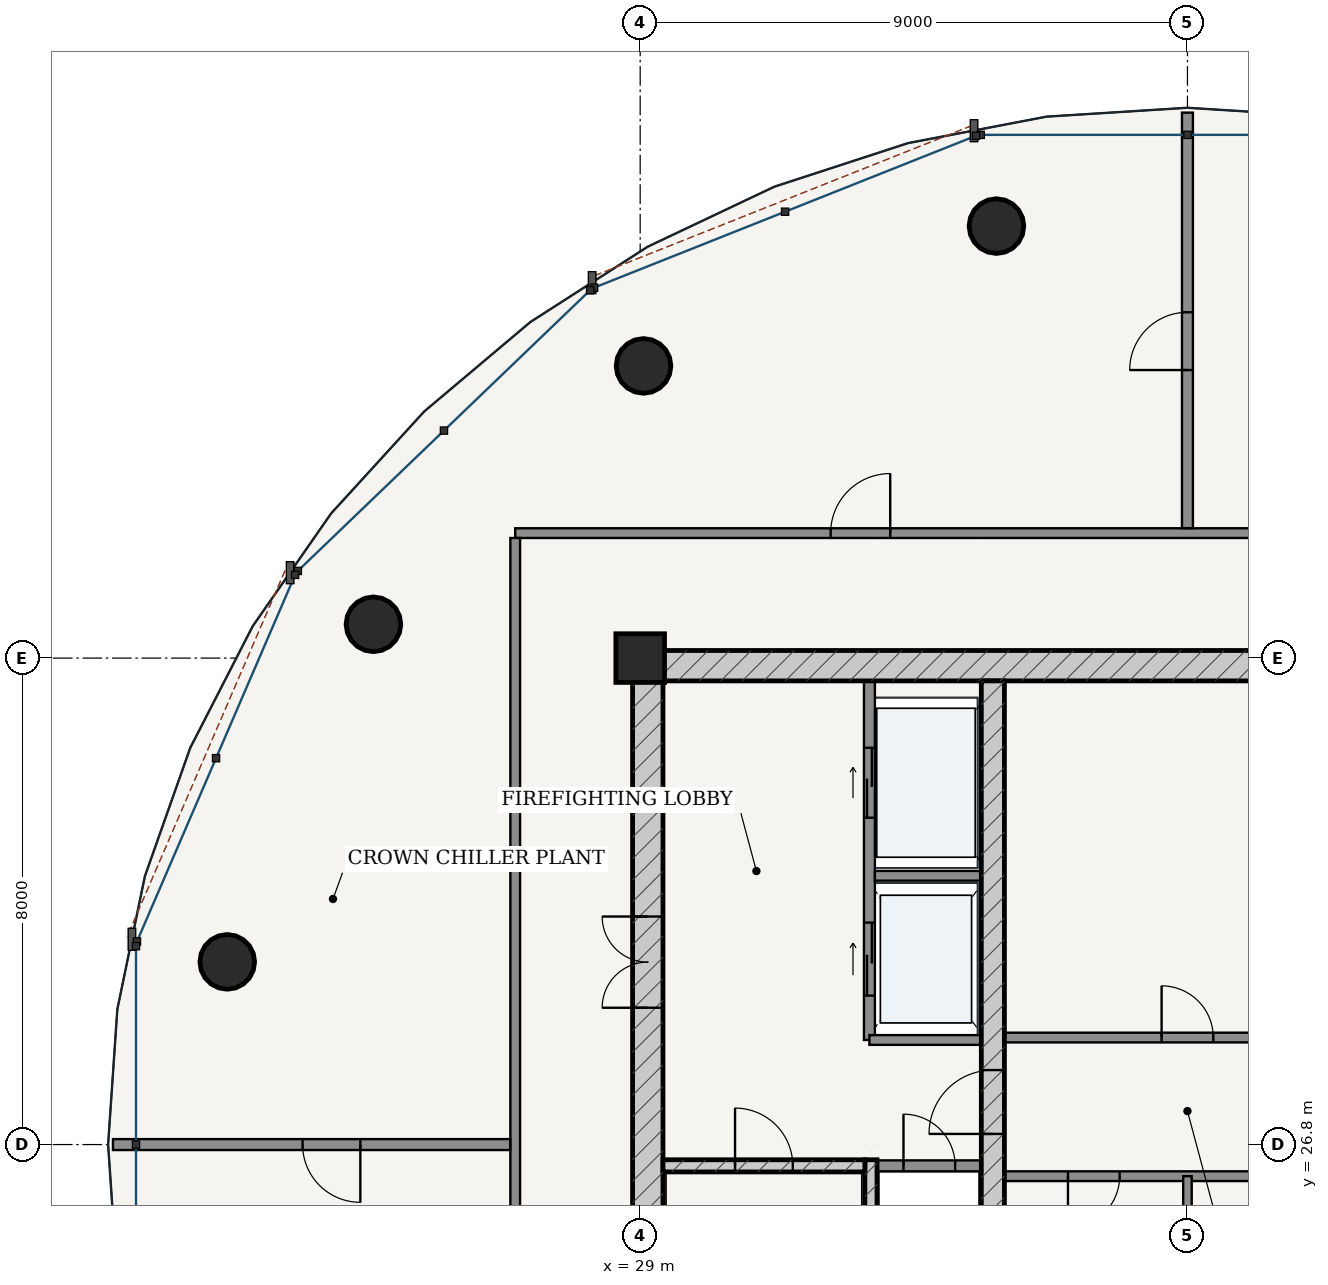
"""IFC4 building model, lengths in metres.
Left out: names, types, materials, properties, quantities, classifications, styles, units other than length and angle.
Written with IfcOpenShell. Run it as: python <this file> out.ifc"""

import sys

from ifc_helpers import new_model, si_unit, direction, frame, frame_2d, origin, origin_2d, place, context, subcontext, project, spatial, rectangle, hollow_circle, extrude, source, transform, mapped, element, fill, save


model = new_model("IFC4")
c1 = context("Model", 3, precision=1e-05, world=origin(), true_north=direction((-0.2419218956, 0.970295726276)))
c2 = subcontext(c1, "Body", "Model", "MODEL_VIEW")
j1 = project(units=[si_unit("LENGTHUNIT", "METRE"), si_unit("PLANEANGLEUNIT", "RADIAN")], contexts=[c1])
p1 = place(None, origin())
s1 = spatial("IfcSite", under=j1, at=p1, CompositionType="ELEMENT")
p2 = place(p1, origin())
s2 = spatial("IfcBuilding", under=s1, at=p2, CompositionType="ELEMENT")
p3 = place(p2, frame((0.0, 0.0, 316.5)))
s3 = spatial("IfcBuildingStorey", under=s2, at=p3, CompositionType="ELEMENT", Elevation=316.5)
p4 = place(p3, frame((29.0, 34.8, 0.0), z_axis=(0.0, 0.0, 1.0), x_axis=(1.0, 0.0, 0.0)))
e1 = element("IfcColumn", 1, at=p4, inside=s3, PredefinedType="COLUMN", context=c2, shape_type="SweptSolid", body=[
    extrude(rectangle(XDim=0.8, YDim=0.8, at=origin_2d()), origin(), (0.0, 0.0, 1.0), 5.2),
])
p5 = place(p3, frame((28.875, 34.675, 0.0), z_axis=(0.0, 0.0, 1.0), x_axis=(1.0, 0.0, 0.0)))
e2 = element("IfcWall", 2, at=p5, inside=s3, PredefinedType="SHEAR", context=c2, shape_type="SweptSolid", body=[
    extrude(rectangle(XDim=18.25, YDim=0.5, at=frame_2d((9.125, 0.0))), origin(), (0.0, 0.0, 1.0), 4.78),
])
p6 = place(p3, frame((29.125, 19.175, 0.0), z_axis=(0.0, 0.0, 1.0), x_axis=(0.0, 1.0, 0.0)))
e3 = element("IfcWall", 3, at=p6, inside=s3, PredefinedType="SHEAR", context=c2, shape_type="SweptSolid", body=[
    extrude(rectangle(XDim=15.25, YDim=0.5, at=frame_2d((7.625, 0.0))), origin(), (0.0, 0.0, 1.0), 4.78),
])
p7 = place(p6, frame((9.875, 0.0, 0.0)))
e4 = element("IfcOpeningElement", 4, at=p7, cuts=e3, PredefinedType="OPENING", context=c2, shape_type="SweptSolid", body=[
    extrude(rectangle(XDim=1.5, YDim=2.2, at=frame_2d((0.75, 1.1))), frame((0.0, 0.26, 0.0), z_axis=(0.0, -1.0, 0.0), x_axis=(1.0, 0.0, 0.0)), (0.0, 0.0, 1.0), 0.52),
])
p8 = place(p3, frame((32.795, 19.175, 0.0), z_axis=(0.0, 0.0, 1.0), x_axis=(0.0, 1.0, 0.0)))
e5 = element("IfcWall", 5, at=p8, inside=s3, PredefinedType="SOLIDWALL", context=c2, shape_type="SweptSolid", body=[
    extrude(rectangle(XDim=7.375, YDim=0.2, at=frame_2d((3.688, 0.0))), origin(), (0.0, 0.0, 1.0), 4.78),
])
p9 = place(p3, frame((29.375, 26.45, 0.0), z_axis=(0.0, 0.0, 1.0), x_axis=(1.0, 0.0, 0.0)))
e6 = element("IfcWall", 6, at=p9, inside=s3, PredefinedType="SOLIDWALL", context=c2, shape_type="SweptSolid", body=[
    extrude(rectangle(XDim=3.32, YDim=0.2, at=frame_2d((1.66, 0.0))), origin(), (0.0, 0.0, 1.0), 4.78),
])
p10 = place(p9, frame((1.185, 0.0, 0.0)))
e7 = element("IfcOpeningElement", 7, at=p10, cuts=e6, PredefinedType="OPENING", context=c2, shape_type="SweptSolid", body=[
    extrude(rectangle(XDim=0.95, YDim=2.15, at=frame_2d((0.475, 1.075))), frame((0.0, 0.11, 0.0), z_axis=(0.0, -1.0, 0.0), x_axis=(1.0, 0.0, 0.0)), (0.0, 0.0, 1.0), 0.22),
])
p11 = place(p3, frame((34.8, 19.175, 0.0), z_axis=(0.0, 0.0, 1.0), x_axis=(0.0, 1.0, 0.0)))
e8 = element("IfcWall", 8, at=p11, inside=s3, PredefinedType="SHEAR", context=c2, shape_type="SweptSolid", body=[
    extrude(rectangle(XDim=15.25, YDim=0.38, at=frame_2d((7.625, 0.0))), origin(), (0.0, 0.0, 1.0), 4.78),
])
p12 = place(p11, frame((7.8, 0.0, 0.0)))
e9 = element("IfcOpeningElement", 9, at=p12, cuts=e8, PredefinedType="OPENING", context=c2, shape_type="SweptSolid", body=[
    extrude(rectangle(XDim=1.05, YDim=2.15, at=frame_2d((0.525, 1.075))), frame((0.0, 0.2, 0.0), z_axis=(0.0, -1.0, 0.0), x_axis=(1.0, 0.0, 0.0)), (0.0, 0.0, 1.0), 0.4),
])
for number, where, z_axis, x_axis in (
    (10, (34.859, 41.904, 0.0), (0.0, 0.0, 1.0), (1.0, 0.0, 0.0)),
    (11, (29.055, 39.605, 0.0), (0.0, 0.0, 1.0), (1.0, 0.0, 0.0)),
    (12, (24.613, 35.356, 0.0), (0.0, 0.0, 1.0), (1.0, 0.0, 0.0)),
    (13, (22.209, 29.804, 0.0), (0.0, 0.0, 1.0), (1.0, 0.0, 0.0)),
):
    element("IfcColumn", number, at=place(p3, frame(where, z_axis=z_axis, x_axis=x_axis)), inside=s3, PredefinedType="COLUMN", context=c2, shape_type="SweptSolid", body=[
        extrude(hollow_circle(Radius=0.45, WallThickness=0.032, at=origin_2d()), origin(), (0.0, 0.0, 1.0), 5.2),
    ])
p13 = place(p3, frame((32.9, 26.45, 0.0), z_axis=(0.0, 0.0, 1.0), x_axis=(1.0, 0.0, 0.0)))
e14 = element("IfcWall", 14, at=p13, inside=s3, PredefinedType="PARTITIONING", context=c2, shape_type="SweptSolid", body=[
    extrude(rectangle(XDim=1.71, YDim=0.18, at=frame_2d((0.855, 0.0))), origin(), (0.0, 0.0, 1.0), 4.78),
])
p14 = place(p13, frame((0.43, 0.0, 0.0)))
e15 = element("IfcOpeningElement", 15, at=p14, cuts=e14, PredefinedType="OPENING", context=c2, shape_type="SweptSolid", body=[
    extrude(rectangle(XDim=0.85, YDim=2.1, at=frame_2d((0.425, 1.05))), frame((0.0, 0.1, 0.0), z_axis=(0.0, -1.0, 0.0), x_axis=(1.0, 0.0, 0.0)), (0.0, 0.0, 1.0), 0.2),
])
p15 = place(p3, frame((32.77, 28.52, 0.0), z_axis=(0.0, 0.0, 1.0), x_axis=(0.0, 1.0, 0.0)))
e16 = element("IfcWall", 16, at=p15, inside=s3, PredefinedType="PARTITIONING", context=c2, shape_type="SweptSolid", body=[
    extrude(rectangle(XDim=5.905, YDim=0.18, at=frame_2d((2.953, 0.0))), origin(), (0.0, 0.0, 1.0), 4.78),
])
p16 = place(p15, frame((3.655, 0.0, 0.0)))
e17 = element("IfcOpeningElement", 17, at=p16, cuts=e16, PredefinedType="OPENING", context=c2, shape_type="SweptSolid", body=[
    extrude(rectangle(XDim=1.15, YDim=2.2, at=frame_2d((0.575, 1.1))), frame((0.0, 0.1, 0.0), z_axis=(0.0, -1.0, 0.0), x_axis=(1.0, 0.0, 0.0)), (0.0, 0.0, 1.0), 0.2),
])
p17 = place(p15, frame((0.73, 0.0, 0.0)))
e18 = element("IfcOpeningElement", 18, at=p17, cuts=e16, PredefinedType="OPENING", context=c2, shape_type="SweptSolid", body=[
    extrude(rectangle(XDim=1.2, YDim=2.25, at=frame_2d((0.6, 1.125))), frame((0.0, 0.1, 0.0), z_axis=(0.0, -1.0, 0.0), x_axis=(1.0, 0.0, 0.0)), (0.0, 0.0, 1.0), 0.2),
])
p18 = place(p3, frame((32.86, 31.22, 0.0), z_axis=(0.0, 0.0, 1.0), x_axis=(1.0, 0.0, 0.0)))
e19 = element("IfcWall", 19, at=p18, inside=s3, PredefinedType="PARTITIONING", context=c2, shape_type="SweptSolid", body=[
    extrude(rectangle(XDim=1.75, YDim=0.16, at=frame_2d((0.875, 0.0))), origin(), (0.0, 0.0, 1.0), 4.78),
])
p19 = place(p3, frame((32.77, 28.52, 0.0), z_axis=(0.0, 0.0, 1.0), x_axis=(1.0, 0.0, 0.0)))
e20 = element("IfcWall", 20, at=p19, inside=s3, PredefinedType="PARTITIONING", context=c2, shape_type="SweptSolid", body=[
    extrude(rectangle(XDim=1.84, YDim=0.16, at=frame_2d((0.92, 0.0))), origin(), (0.0, 0.0, 1.0), 4.78),
])
p20 = place(p3, frame((34.99, 28.56, 0.0), z_axis=(0.0, 0.0, 1.0), x_axis=(1.0, 0.0, 0.0)))
e21 = element("IfcWall", 21, at=p20, inside=s3, PredefinedType="PARTITIONING", context=c2, shape_type="SweptSolid", body=[
    extrude(rectangle(XDim=6.02, YDim=0.16, at=frame_2d((3.01, 0.0))), origin(), (0.0, 0.0, 1.0), 4.78),
])
p21 = place(p20, frame((2.585, 0.0, 0.0)))
e22 = element("IfcOpeningElement", 22, at=p21, cuts=e21, PredefinedType="OPENING", context=c2, shape_type="SweptSolid", body=[
    extrude(rectangle(XDim=0.85, YDim=2.1, at=frame_2d((0.425, 1.05))), frame((0.0, 0.09, 0.0), z_axis=(0.0, -1.0, 0.0), x_axis=(1.0, 0.0, 0.0)), (0.0, 0.0, 1.0), 0.18),
])
p22 = place(p3, frame((34.99, 26.28, 0.0), z_axis=(0.0, 0.0, 1.0), x_axis=(1.0, 0.0, 0.0)))
e23 = element("IfcWall", 23, at=p22, inside=s3, PredefinedType="PARTITIONING", context=c2, shape_type="SweptSolid", body=[
    extrude(rectangle(XDim=6.02, YDim=0.16, at=frame_2d((3.01, 0.0))), origin(), (0.0, 0.0, 1.0), 4.78),
])
p23 = place(p22, frame((1.045, 0.0, 0.0)))
e24 = element("IfcOpeningElement", 24, at=p23, cuts=e23, PredefinedType="OPENING", context=c2, shape_type="SweptSolid", body=[
    extrude(rectangle(XDim=0.85, YDim=2.1, at=frame_2d((0.425, 1.05))), frame((0.0, 0.09, 0.0), z_axis=(0.0, -1.0, 0.0), x_axis=(1.0, 0.0, 0.0)), (0.0, 0.0, 1.0), 0.18),
])
p24 = place(p22, frame((4.125, 0.0, 0.0)))
e25 = element("IfcOpeningElement", 25, at=p24, cuts=e23, PredefinedType="OPENING", context=c2, shape_type="SweptSolid", body=[
    extrude(rectangle(XDim=0.85, YDim=2.1, at=frame_2d((0.425, 1.05))), frame((0.0, 0.09, 0.0), z_axis=(0.0, -1.0, 0.0), x_axis=(1.0, 0.0, 0.0)), (0.0, 0.0, 1.0), 0.18),
])
p25 = place(p3, frame((38.0, 23.72, 0.0), z_axis=(0.0, 0.0, 1.0), x_axis=(0.0, 1.0, 0.0)))
e26 = element("IfcWall", 26, at=p25, inside=s3, PredefinedType="PARTITIONING", context=c2, shape_type="SweptSolid", body=[
    extrude(rectangle(XDim=2.56, YDim=0.14, at=frame_2d((1.28, 0.0))), origin(), (0.0, 0.0, 1.0), 4.78),
])
p26 = place(p3, frame((26.945, 36.855, 0.0), z_axis=(0.0, 0.0, 1.0), x_axis=(1.0, 0.0, 0.0)))
e27 = element("IfcWall", 27, at=p26, inside=s3, PredefinedType="PARTITIONING", context=c2, shape_type="SweptSolid", body=[
    extrude(rectangle(XDim=22.11, YDim=0.16, at=frame_2d((11.055, 0.0))), origin(), (0.0, 0.0, 1.0), 4.352),
])
p27 = place(p26, frame((15.943, 0.0, 0.0)))
e28 = element("IfcOpeningElement", 28, at=p27, cuts=e27, PredefinedType="OPENING", context=c2, shape_type="SweptSolid", body=[
    extrude(rectangle(XDim=0.98, YDim=2.2, at=frame_2d((0.49, 1.1))), frame((0.0, 0.09, 0.0), z_axis=(0.0, -1.0, 0.0), x_axis=(1.0, 0.0, 0.0)), (0.0, 0.0, 1.0), 0.18),
])
p28 = place(p26, frame((5.187, 0.0, 0.0)))
e29 = element("IfcOpeningElement", 29, at=p28, cuts=e27, PredefinedType="OPENING", context=c2, shape_type="SweptSolid", body=[
    extrude(rectangle(XDim=0.98, YDim=2.2, at=frame_2d((0.49, 1.1))), frame((0.0, 0.09, 0.0), z_axis=(0.0, -1.0, 0.0), x_axis=(1.0, 0.0, 0.0)), (0.0, 0.0, 1.0), 0.18),
])
p29 = place(p3, frame((26.945, 16.825, 0.0), z_axis=(0.0, 0.0, 1.0), x_axis=(0.0, 1.0, 0.0)))
e30 = element("IfcWall", 30, at=p29, inside=s3, PredefinedType="PARTITIONING", context=c2, shape_type="SweptSolid", body=[
    extrude(rectangle(XDim=19.95, YDim=0.16, at=frame_2d((9.975, 0.0))), origin(), (0.0, 0.0, 1.0), 4.352),
])
p30 = place(p3, frame((38.0, 36.937, 0.0), z_axis=(0.0, 0.0, 1.0), x_axis=(0.0, 1.0, 0.0)))
e31 = element("IfcWall", 31, at=p30, inside=s3, PredefinedType="PARTITIONING", context=c2, shape_type="SweptSolid", body=[
    extrude(rectangle(XDim=6.833, YDim=0.18, at=frame_2d((3.417, 0.0))), origin(), (0.0, 0.0, 1.0), 4.411),
])
p31 = place(p30, frame((2.6, 0.0, 0.0)))
e32 = element("IfcOpeningElement", 32, at=p31, cuts=e31, PredefinedType="OPENING", context=c2, shape_type="SweptSolid", body=[
    extrude(rectangle(XDim=0.95, YDim=2.15, at=frame_2d((0.475, 1.075))), frame((0.0, 0.1, 0.0), z_axis=(0.0, -1.0, 0.0), x_axis=(1.0, 0.0, 0.0)), (0.0, 0.0, 1.0), 0.2),
])
p32 = place(p3, frame((26.863, 26.8, 0.0), z_axis=(0.0, 0.0, 1.0), x_axis=(-1.0, 0.0, 0.0)))
e33 = element("IfcWall", 33, at=p32, inside=s3, PredefinedType="PARTITIONING", context=c2, shape_type="SweptSolid", body=[
    extrude(rectangle(XDim=6.533, YDim=0.18, at=frame_2d((3.267, 0.0))), origin(), (0.0, 0.0, 1.0), 4.411),
])
p33 = place(p32, frame((2.465, 0.0, 0.0)))
e34 = element("IfcOpeningElement", 34, at=p33, cuts=e33, PredefinedType="OPENING", context=c2, shape_type="SweptSolid", body=[
    extrude(rectangle(XDim=0.95, YDim=2.15, at=frame_2d((0.475, 1.075))), frame((0.0, 0.1, 0.0), z_axis=(0.0, -1.0, 0.0), x_axis=(1.0, 0.0, 0.0)), (0.0, 0.0, 1.0), 0.2),
])
m1 = source(origin(), c2, "Body", "SweptSolid", [
    extrude(rectangle(XDim=1.5, YDim=2.2, at=frame_2d((0.75, 1.1))), frame((0.0, 0.025, 0.0), z_axis=(0.0, -1.0, 0.0), x_axis=(1.0, 0.0, 0.0)), (0.0, 0.0, 1.0), 0.05),
])
p34 = place(p7, origin())
e35 = element("IfcDoor", 35, at=p34, inside=s3, OperationType="DOUBLE_DOOR_SINGLE_SWING", PredefinedType="DOOR", context=c2, shape_type="MappedRepresentation", body=[
    mapped(m1, transform((0.0, 0.0, 0.0), scale=1.0)),
])
fill(e4, e35)
m2 = source(origin(), c2, "Body", "SweptSolid", [
    extrude(rectangle(XDim=1.05, YDim=2.15, at=frame_2d((0.525, 1.075))), frame((0.0, 0.025, 0.0), z_axis=(0.0, -1.0, 0.0), x_axis=(1.0, 0.0, 0.0)), (0.0, 0.0, 1.0), 0.05),
])
p35 = place(p12, origin())
e36 = element("IfcDoor", 36, at=p35, inside=s3, OperationType="SINGLE_SWING_LEFT", PredefinedType="DOOR", context=c2, shape_type="MappedRepresentation", body=[
    mapped(m2, transform((0.0, 0.0, 0.0), scale=1.0)),
])
fill(e9, e36)
m3 = source(origin(), c2, "Body", "SweptSolid", [
    extrude(rectangle(XDim=0.95, YDim=2.15, at=frame_2d((0.475, 1.075))), frame((0.0, 0.025, 0.0), z_axis=(0.0, -1.0, 0.0), x_axis=(1.0, 0.0, 0.0)), (0.0, 0.0, 1.0), 0.05),
])
p36 = place(p10, origin())
e37 = element("IfcDoor", 37, at=p36, inside=s3, OperationType="SINGLE_SWING_LEFT", PredefinedType="DOOR", context=c2, shape_type="MappedRepresentation", body=[
    mapped(m3, transform((0.0, 0.0, 0.0), scale=1.0)),
])
fill(e7, e37)
m4 = source(origin(), c2, "Body", "SweptSolid", [
    extrude(rectangle(XDim=0.85, YDim=2.1, at=frame_2d((0.425, 1.05))), frame((0.0, 0.025, 0.0), z_axis=(0.0, -1.0, 0.0), x_axis=(1.0, 0.0, 0.0)), (0.0, 0.0, 1.0), 0.05),
])
p37 = place(p14, origin())
e38 = element("IfcDoor", 38, at=p37, inside=s3, OperationType="SINGLE_SWING_LEFT", PredefinedType="DOOR", context=c2, shape_type="MappedRepresentation", body=[
    mapped(m4, transform((0.0, 0.0, 0.0), scale=1.0)),
])
fill(e15, e38)
p38 = place(p21, origin())
e39 = element("IfcDoor", 39, at=p38, inside=s3, OperationType="SINGLE_SWING_LEFT", PredefinedType="DOOR", context=c2, shape_type="MappedRepresentation", body=[
    mapped(m4, transform((0.0, 0.0, 0.0), scale=1.0)),
])
fill(e22, e39)
p39 = place(p23, frame((0.85, 0.0, 0.0), z_axis=(0.0, 0.0, 1.0), x_axis=(-1.0, 0.0, 0.0)))
e40 = element("IfcDoor", 40, at=p39, inside=s3, OperationType="SINGLE_SWING_RIGHT", PredefinedType="DOOR", context=c2, shape_type="MappedRepresentation", body=[
    mapped(m4, transform((0.0, 0.0, 0.0), scale=1.0)),
])
fill(e24, e40)
m5 = source(origin(), c2, "Body", "SweptSolid", [
    extrude(rectangle(XDim=1.15, YDim=2.2, at=frame_2d((0.575, 1.1))), frame((0.0, 0.025, 0.0), z_axis=(0.0, -1.0, 0.0), x_axis=(1.0, 0.0, 0.0)), (0.0, 0.0, 1.0), 0.05),
])
p40 = place(p16, origin())
e41 = element("IfcDoor", 41, at=p40, inside=s3, OperationType="DOUBLE_DOOR_SLIDING", PredefinedType="DOOR", context=c2, shape_type="MappedRepresentation", body=[
    mapped(m5, transform((0.0, 0.0, 0.0), scale=1.0)),
])
fill(e17, e41)
m6 = source(origin(), c2, "Body", "SweptSolid", [
    extrude(rectangle(XDim=1.2, YDim=2.25, at=frame_2d((0.6, 1.125))), frame((0.0, 0.025, 0.0), z_axis=(0.0, -1.0, 0.0), x_axis=(1.0, 0.0, 0.0)), (0.0, 0.0, 1.0), 0.05),
])
p41 = place(p17, origin())
e42 = element("IfcDoor", 42, at=p41, inside=s3, OperationType="DOUBLE_DOOR_SLIDING", PredefinedType="DOOR", context=c2, shape_type="MappedRepresentation", body=[
    mapped(m6, transform((0.0, 0.0, 0.0), scale=1.0)),
])
fill(e18, e42)
m7 = source(origin(), c2, "Body", "SweptSolid", [
    extrude(rectangle(XDim=0.98, YDim=2.2, at=frame_2d((0.49, 1.1))), frame((0.0, 0.025, 0.0), z_axis=(0.0, -1.0, 0.0), x_axis=(1.0, 0.0, 0.0)), (0.0, 0.0, 1.0), 0.05),
])
p42 = place(p28, origin())
e43 = element("IfcDoor", 43, at=p42, inside=s3, OperationType="SINGLE_SWING_RIGHT", PredefinedType="DOOR", context=c2, shape_type="MappedRepresentation", body=[
    mapped(m7, transform((0.0, 0.0, 0.0), scale=1.0)),
])
fill(e29, e43)
p43 = place(p31, origin())
e44 = element("IfcDoor", 44, at=p43, inside=s3, OperationType="SINGLE_SWING_LEFT", PredefinedType="DOOR", context=c2, shape_type="MappedRepresentation", body=[
    mapped(m3, transform((0.0, 0.0, 0.0), scale=1.0)),
])
fill(e32, e44)
p44 = place(p33, origin())
e45 = element("IfcDoor", 45, at=p44, inside=s3, OperationType="SINGLE_SWING_LEFT", PredefinedType="DOOR", context=c2, shape_type="MappedRepresentation", body=[
    mapped(m3, transform((0.0, 0.0, 0.0), scale=1.0)),
])
fill(e34, e45)
save(model, sys.argv[1])
